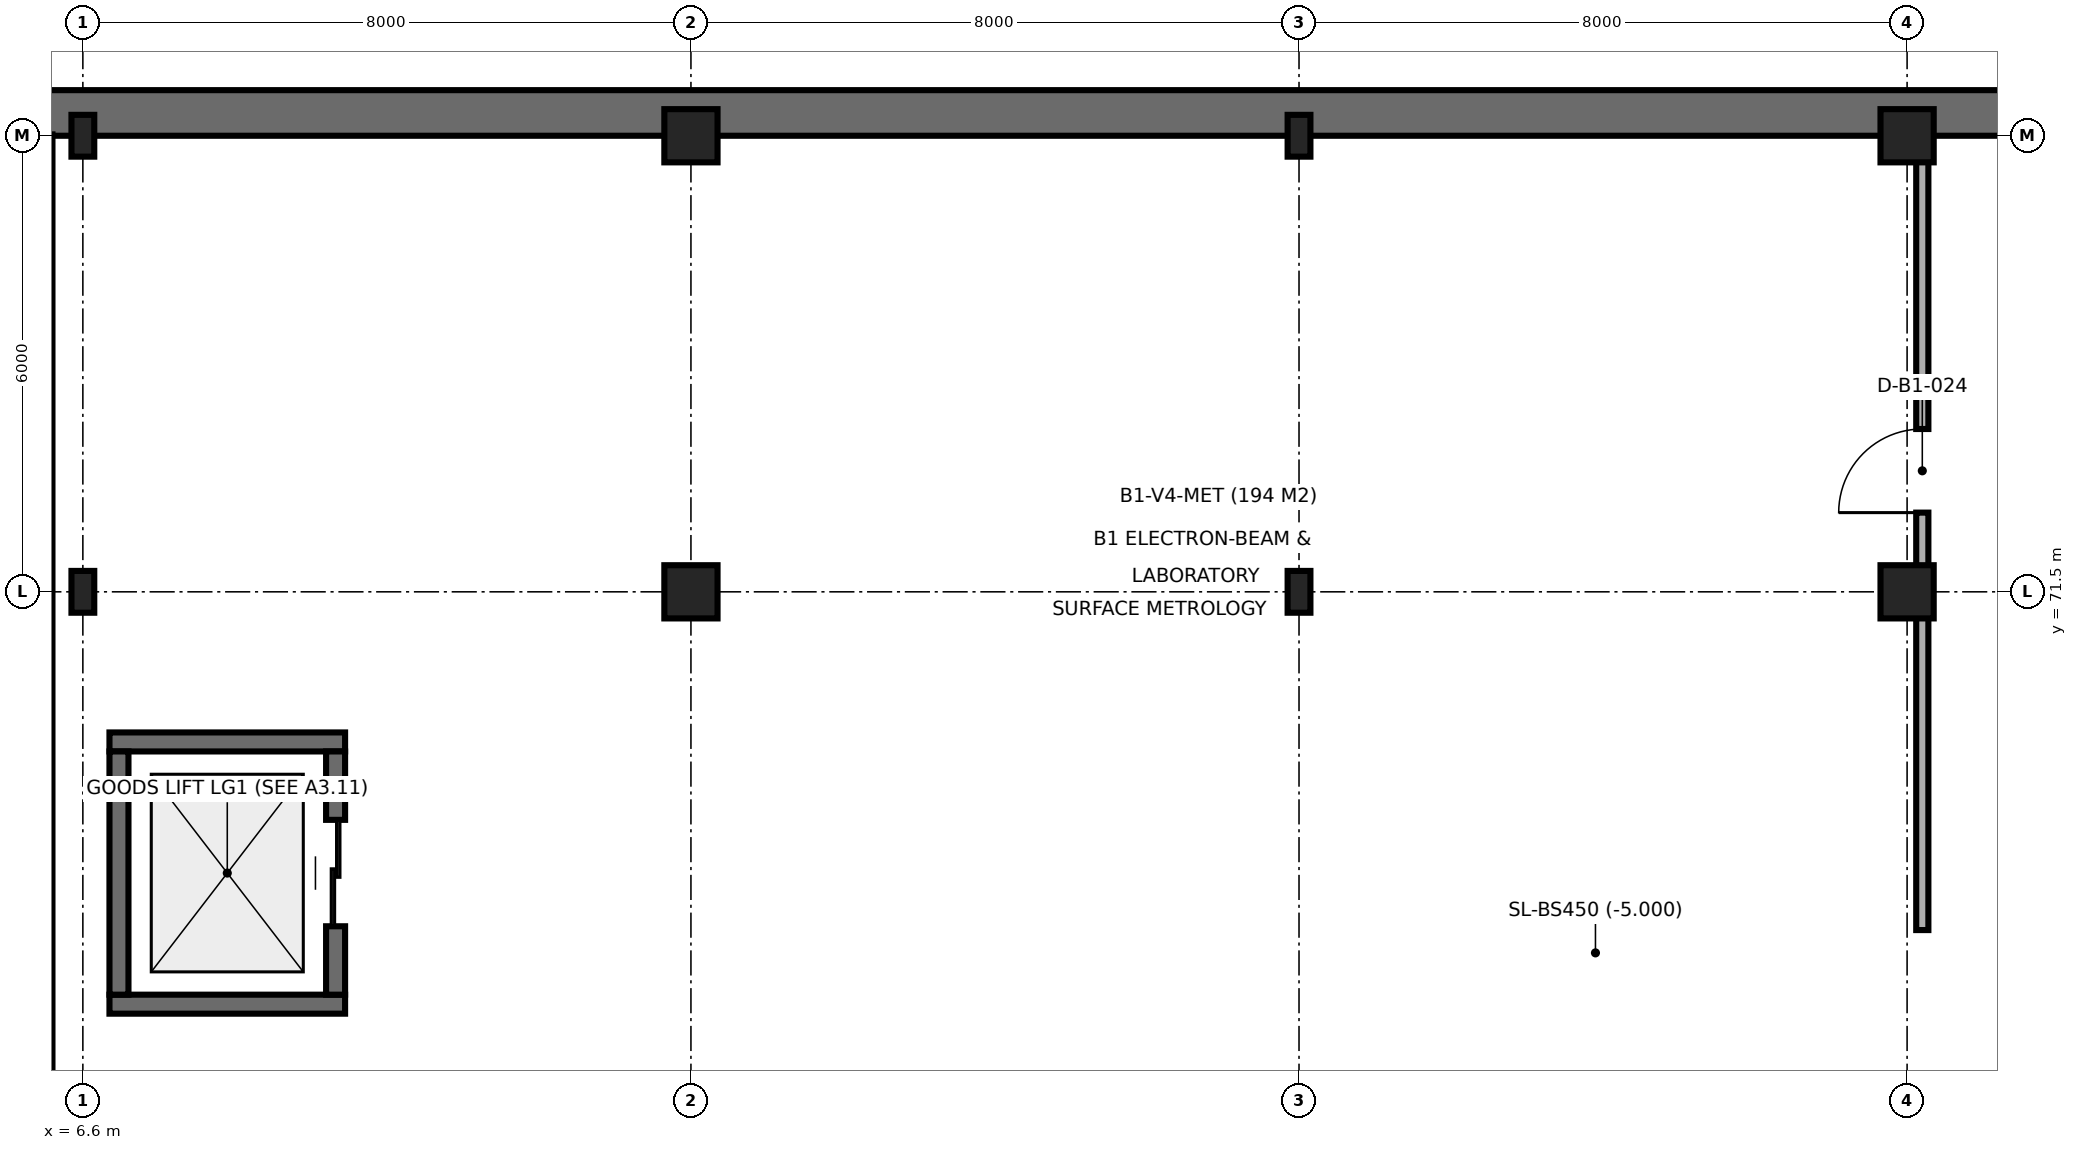
"""IFC4 building model, lengths in metres.
Left out: names, types, materials, properties, quantities, classifications, styles, units other than length and angle.
Written with IfcOpenShell. Run it as: python <this file> out.ifc"""

import sys

from ifc_helpers import new_model, si_unit, direction, frame, frame_2d, origin, origin_2d, place, context, subcontext, project, spatial, rectangle, i_section, extrude, element, fill, save


model = new_model("IFC4")
c1 = context("Model", 3, precision=1e-05, world=origin(), true_north=direction((0.0, 1.0)))
c2 = subcontext(c1, "Body", "Model", "MODEL_VIEW")
j1 = project(units=[si_unit("LENGTHUNIT", "METRE"), si_unit("PLANEANGLEUNIT", "RADIAN")], contexts=[c1])
p1 = place(None, origin())
s1 = spatial("IfcSite", under=j1, at=p1, CompositionType="ELEMENT")
p2 = place(p1, origin())
s2 = spatial("IfcBuilding", under=s1, at=p2, CompositionType="ELEMENT")
p3 = place(p2, frame((0.0, 0.0, -5.0)))
s3 = spatial("IfcBuildingStorey", under=s2, at=p3, CompositionType="ELEMENT", Elevation=-5.0)
for number, where, z_axis, x_axis in (
    (1, (6.6, 71.5, 0.0), (0.0, 0.0, 1.0), (1.0, 0.0, 0.0)),
    (2, (6.6, 77.5, 0.0), (0.0, 0.0, 1.0), (1.0, 0.0, 0.0)),
):
    element("IfcColumn", number, at=place(p3, frame(where, z_axis=z_axis, x_axis=x_axis)), inside=s3, PredefinedType="COLUMN", context=c2, shape_type="SweptSolid", body=[
        extrude(i_section(OverallWidth=0.3, OverallDepth=0.55, WebThickness=0.015, FlangeThickness=0.029, FilletRadius=0.027, at=origin_2d()), origin(), (0.0, 0.0, 1.0), 5.0),
    ])
for number, where, z_axis, x_axis in (
    (3, (14.6, 71.5, 0.0), (0.0, 0.0, 1.0), (1.0, 0.0, 0.0)),
    (4, (14.6, 77.5, 0.0), (0.0, 0.0, 1.0), (1.0, 0.0, 0.0)),
):
    element("IfcColumn", number, at=place(p3, frame(where, z_axis=z_axis, x_axis=x_axis)), inside=s3, PredefinedType="COLUMN", context=c2, shape_type="SweptSolid", body=[
        extrude(rectangle(XDim=0.7, YDim=0.7, at=origin_2d()), origin(), (0.0, 0.0, 1.0), 5.0),
    ])
for number, where, z_axis, x_axis in (
    (5, (22.6, 71.5, 0.0), (0.0, 0.0, 1.0), (1.0, 0.0, 0.0)),
    (6, (22.6, 77.5, 0.0), (0.0, 0.0, 1.0), (1.0, 0.0, 0.0)),
):
    element("IfcColumn", number, at=place(p3, frame(where, z_axis=z_axis, x_axis=x_axis)), inside=s3, PredefinedType="COLUMN", context=c2, shape_type="SweptSolid", body=[
        extrude(i_section(OverallWidth=0.3, OverallDepth=0.55, WebThickness=0.015, FlangeThickness=0.029, FilletRadius=0.027, at=origin_2d()), origin(), (0.0, 0.0, 1.0), 5.0),
    ])
for number, where, z_axis, x_axis in (
    (7, (30.6, 71.5, 0.0), (0.0, 0.0, 1.0), (1.0, 0.0, 0.0)),
    (8, (30.6, 77.5, 0.0), (0.0, 0.0, 1.0), (1.0, 0.0, 0.0)),
):
    element("IfcColumn", number, at=place(p3, frame(where, z_axis=z_axis, x_axis=x_axis)), inside=s3, PredefinedType="COLUMN", context=c2, shape_type="SweptSolid", body=[
        extrude(rectangle(XDim=0.7, YDim=0.7, at=origin_2d()), origin(), (0.0, 0.0, 1.0), 5.0),
    ])
for number, where, z_axis, x_axis in (
    (9, (6.95, 66.075, 0.0), (0.0, 0.0, 1.0), (1.0, 0.0, 0.0)),
    (10, (10.05, 69.525, 0.0), (0.0, 0.0, 1.0), (-1.0, 0.0, 0.0)),
):
    element("IfcWall", number, at=place(p3, frame(where, z_axis=z_axis, x_axis=x_axis)), inside=s3, PredefinedType="SHEAR", context=c2, shape_type="SweptSolid", body=[
        extrude(rectangle(XDim=3.1, YDim=0.25, at=frame_2d((1.55, 0.0))), origin(), (0.0, 0.0, 1.0), 5.0),
    ])
p4 = place(p3, frame((7.075, 69.4, 0.0), z_axis=(0.0, 0.0, 1.0), x_axis=(0.0, -1.0, 0.0)))
e11 = element("IfcWall", 11, at=p4, inside=s3, PredefinedType="SHEAR", context=c2, shape_type="SweptSolid", body=[
    extrude(rectangle(XDim=3.2, YDim=0.25, at=frame_2d((1.6, 0.0))), origin(), (0.0, 0.0, 1.0), 5.0),
])
p5 = place(p3, frame((9.925, 66.2, 0.0), z_axis=(0.0, 0.0, 1.0), x_axis=(0.0, 1.0, 0.0)))
e12 = element("IfcWall", 12, at=p5, inside=s3, PredefinedType="SHEAR", context=c2, shape_type="SweptSolid", body=[
    extrude(rectangle(XDim=3.2, YDim=0.25, at=frame_2d((1.6, 0.0))), origin(), (0.0, 0.0, 1.0), 5.0),
])
p6 = place(p5, frame((0.9, 0.0, 0.0)))
e13 = element("IfcOpeningElement", 13, at=p6, cuts=e12, PredefinedType="OPENING", context=c2, shape_type="SweptSolid", body=[
    extrude(rectangle(XDim=1.4, YDim=2.2, at=frame_2d((0.7, 1.1))), frame((0.0, 0.135, 0.0), z_axis=(0.0, -1.0, 0.0), x_axis=(1.0, 0.0, 0.0)), (0.0, 0.0, 1.0), 0.27),
])
p7 = place(p3, frame((43.57, 77.8, 0.0), z_axis=(0.0, 0.0, 1.0), x_axis=(-1.0, 0.0, 0.0)))
e14 = element("IfcWall", 14, at=p7, inside=s3, PredefinedType="SHEAR", context=c2, shape_type="SweptSolid", body=[
    extrude(rectangle(XDim=37.969, YDim=0.6, at=frame_2d((18.985, 0.0))), origin(), (0.0, 0.0, 1.0), 4.7),
])
p8 = place(p3, frame((30.8, 67.05, 0.0), z_axis=(0.0, 0.0, 1.0), x_axis=(0.0, 1.0, 0.0)))
e15 = element("IfcWall", 15, at=p8, inside=s3, PredefinedType="PARTITIONING", context=c2, shape_type="SweptSolid", body=[
    extrude(rectangle(XDim=4.2, YDim=0.16, at=frame_2d((2.1, 0.0))), origin(), (0.0, 0.0, 1.0), 4.2),
])
p9 = place(p3, frame((30.8, 71.75, 0.0), z_axis=(0.0, 0.0, 1.0), x_axis=(0.0, 1.0, 0.0)))
e16 = element("IfcWall", 16, at=p9, inside=s3, PredefinedType="PARTITIONING", context=c2, shape_type="SweptSolid", body=[
    extrude(rectangle(XDim=5.5, YDim=0.16, at=frame_2d((2.75, 0.0))), origin(), (0.0, 0.0, 1.0), 4.2),
])
p10 = place(p9, frame((0.792, 0.0, 0.0)))
e17 = element("IfcOpeningElement", 17, at=p10, cuts=e16, PredefinedType="OPENING", context=c2, shape_type="SweptSolid", body=[
    extrude(rectangle(XDim=1.1, YDim=2.15, at=frame_2d((0.55, 1.075))), frame((0.0, 0.09, 0.0), z_axis=(0.0, -1.0, 0.0), x_axis=(1.0, 0.0, 0.0)), (0.0, 0.0, 1.0), 0.18),
])
p11 = place(p6, origin())
e18 = element("IfcDoor", 18, at=p11, inside=s3, OperationType="DOUBLE_DOOR_SLIDING", PredefinedType="DOOR", context=c2, shape_type="SweptSolid", body=[
    extrude(rectangle(XDim=1.4, YDim=2.2, at=frame_2d((0.7, 1.1))), frame((0.0, 0.025, 0.0), z_axis=(0.0, -1.0, 0.0), x_axis=(1.0, 0.0, 0.0)), (0.0, 0.0, 1.0), 0.05),
])
fill(e13, e18)
p12 = place(p10, origin())
e19 = element("IfcDoor", 19, at=p12, inside=s3, OperationType="SINGLE_SWING_LEFT", PredefinedType="DOOR", context=c2, shape_type="SweptSolid", body=[
    extrude(rectangle(XDim=1.1, YDim=2.15, at=frame_2d((0.55, 1.075))), frame((0.0, 0.025, 0.0), z_axis=(0.0, -1.0, 0.0), x_axis=(1.0, 0.0, 0.0)), (0.0, 0.0, 1.0), 0.05),
])
fill(e17, e19)
save(model, sys.argv[1])
